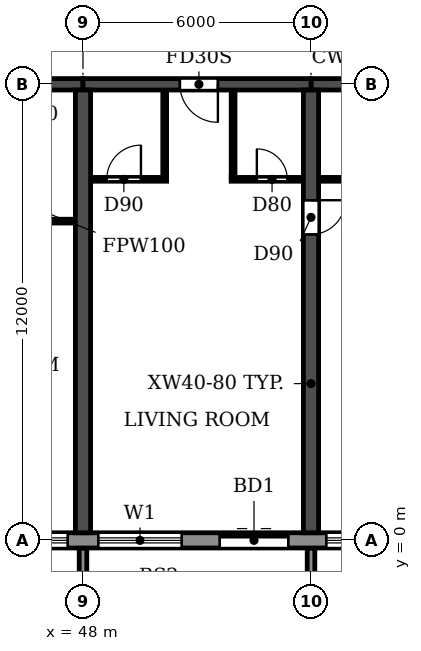
"""IFC4 building model, lengths in metres.
Left out: names, types, materials, properties, quantities, classifications, styles, units other than length and angle.
Written with IfcOpenShell. Run it as: python <this file> out.ifc"""

import sys

from ifc_helpers import new_model, si_unit, direction, frame, frame_2d, origin, place, context, subcontext, project, spatial, polyline, rectangle, outline, extrude, source, transform, mapped, element, fill, save


model = new_model("IFC4")
c1 = context("Model", 3, precision=1e-05, world=origin(), true_north=direction((0.0, 1.0)))
c2 = subcontext(c1, "Body", "Model", "MODEL_VIEW")
j1 = project(units=[si_unit("LENGTHUNIT", "METRE"), si_unit("PLANEANGLEUNIT", "RADIAN")], contexts=[c1])
p1 = place(None, origin())
s1 = spatial("IfcSite", under=j1, at=p1, CompositionType="ELEMENT")
p2 = place(p1, origin())
s2 = spatial("IfcBuilding", under=s1, at=p2, CompositionType="ELEMENT")
p3 = place(p2, frame((0.0, 0.0, 43.2)))
s3 = spatial("IfcBuildingStorey", under=s2, at=p3, CompositionType="ELEMENT", Elevation=43.2)
p4 = place(p3, frame((48.0, 0.2, 0.0), z_axis=(0.0, 0.0, 1.0), x_axis=(0.0, 1.0, 0.0)))
e1 = element("IfcWall", 1, at=p4, inside=s3, PredefinedType="SHEAR", context=c2, shape_type="SweptSolid", body=[
    extrude(rectangle(XDim=11.65, YDim=0.4, at=frame_2d((5.825, 0.0))), origin(), (0.0, 0.0, 1.0), 3.05),
])
p5 = place(p3, frame((54.0, 0.2, 0.0), z_axis=(0.0, 0.0, 1.0), x_axis=(0.0, 1.0, 0.0)))
e2 = element("IfcWall", 2, at=p5, inside=s3, PredefinedType="SHEAR", context=c2, shape_type="SweptSolid", body=[
    extrude(rectangle(XDim=11.65, YDim=0.4, at=frame_2d((5.825, 0.0))), origin(), (0.0, 0.0, 1.0), 3.05),
])
p6 = place(p5, frame((7.85, 0.0, 0.0)))
e3 = element("IfcOpeningElement", 3, at=p6, cuts=e2, PredefinedType="OPENING", context=c2, shape_type="SweptSolid", body=[
    extrude(rectangle(XDim=0.9, YDim=2.1, at=frame_2d((0.45, 1.05))), frame((0.0, 0.21, 0.0), z_axis=(0.0, -1.0, 0.0), x_axis=(1.0, 0.0, 0.0)), (0.0, 0.0, 1.0), 0.42),
])
p7 = place(p3, frame((42.0, 12.0, 0.0), z_axis=(0.0, 0.0, 1.0), x_axis=(1.0, 0.0, 0.0)))
e4 = element("IfcWall", 4, at=p7, inside=s3, PredefinedType="SHEAR", context=c2, shape_type="SweptSolid", body=[
    extrude(rectangle(XDim=6.0, YDim=0.3, at=frame_2d((3.0, 0.0))), origin(), (0.0, 0.0, 1.0), 2.45),
])
p8 = place(p7, frame((2.45, 0.0, 0.0)))
e5 = element("IfcOpeningElement", 5, at=p8, cuts=e4, PredefinedType="OPENING", context=c2, shape_type="SweptSolid", body=[
    extrude(rectangle(XDim=1.0, YDim=2.1, at=frame_2d((0.5, 1.05))), frame((0.0, 0.16, 0.0), z_axis=(0.0, -1.0, 0.0), x_axis=(1.0, 0.0, 0.0)), (0.0, 0.0, 1.0), 0.32),
])
p9 = place(p3, frame((48.0, 12.0, 0.0), z_axis=(0.0, 0.0, 1.0), x_axis=(1.0, 0.0, 0.0)))
e6 = element("IfcWall", 6, at=p9, inside=s3, PredefinedType="SHEAR", context=c2, shape_type="SweptSolid", body=[
    extrude(rectangle(XDim=6.0, YDim=0.3, at=frame_2d((3.0, 0.0))), origin(), (0.0, 0.0, 1.0), 2.45),
])
p10 = place(p9, frame((2.55, 0.0, 0.0)))
e7 = element("IfcOpeningElement", 7, at=p10, cuts=e6, PredefinedType="OPENING", context=c2, shape_type="SweptSolid", body=[
    extrude(rectangle(XDim=1.0, YDim=2.1, at=frame_2d((0.5, 1.05))), frame((0.0, 0.16, 0.0), z_axis=(0.0, -1.0, 0.0), x_axis=(1.0, 0.0, 0.0)), (0.0, 0.0, 1.0), 0.32),
])
p11 = place(p3, frame((54.0, 12.0, 0.0), z_axis=(0.0, 0.0, 1.0), x_axis=(1.0, 0.0, 0.0)))
e8 = element("IfcWall", 8, at=p11, inside=s3, PredefinedType="SHEAR", context=c2, shape_type="SweptSolid", body=[
    extrude(rectangle(XDim=6.0, YDim=0.3, at=frame_2d((3.0, 0.0))), origin(), (0.0, 0.0, 1.0), 2.45),
])
p12 = place(p3, frame((4.683, 0.0, 0.0), z_axis=(0.0, 0.0, 1.0), x_axis=(1.0, 0.0, 0.0)))
e9 = element("IfcWall", 9, at=p12, inside=s3, PredefinedType="STANDARD", context=c2, shape_type="SweptSolid", body=[
    extrude(rectangle(XDim=92.634, YDim=0.4, at=frame_2d((46.317, 0.0))), origin(), (0.0, 0.0, 1.0), 3.05),
])
p13 = place(p12, frame((1.717, 0.0, 0.9)))
e10 = element("IfcOpeningElement", 10, at=p13, cuts=e9, PredefinedType="OPENING", context=c2, shape_type="SweptSolid", body=[
    extrude(rectangle(XDim=2.2, YDim=1.5, at=frame_2d((1.1, 0.75))), frame((0.0, 0.21, 0.0), z_axis=(0.0, -1.0, 0.0), x_axis=(1.0, 0.0, 0.0)), (0.0, 0.0, 1.0), 0.42),
])
p14 = place(p12, frame((4.717, 0.0, 0.9)))
e11 = element("IfcOpeningElement", 11, at=p14, cuts=e9, PredefinedType="OPENING", context=c2, shape_type="SweptSolid", body=[
    extrude(rectangle(XDim=2.2, YDim=1.5, at=frame_2d((1.1, 0.75))), frame((0.0, 0.21, 0.0), z_axis=(0.0, -1.0, 0.0), x_axis=(1.0, 0.0, 0.0)), (0.0, 0.0, 1.0), 0.42),
])
p15 = place(p12, frame((7.717, 0.0, 0.9)))
e12 = element("IfcOpeningElement", 12, at=p15, cuts=e9, PredefinedType="OPENING", context=c2, shape_type="SweptSolid", body=[
    extrude(rectangle(XDim=2.2, YDim=1.5, at=frame_2d((1.1, 0.75))), frame((0.0, 0.21, 0.0), z_axis=(0.0, -1.0, 0.0), x_axis=(1.0, 0.0, 0.0)), (0.0, 0.0, 1.0), 0.42),
])
p16 = place(p12, frame((10.917, 0.0, 0.0)))
e13 = element("IfcOpeningElement", 13, at=p16, cuts=e9, PredefinedType="OPENING", context=c2, shape_type="SweptSolid", body=[
    extrude(rectangle(XDim=1.8, YDim=2.4, at=frame_2d((0.9, 1.2))), frame((0.0, 0.21, 0.0), z_axis=(0.0, -1.0, 0.0), x_axis=(1.0, 0.0, 0.0)), (0.0, 0.0, 1.0), 0.42),
])
p17 = place(p12, frame((13.717, 0.0, 0.9)))
e14 = element("IfcOpeningElement", 14, at=p17, cuts=e9, PredefinedType="OPENING", context=c2, shape_type="SweptSolid", body=[
    extrude(rectangle(XDim=2.2, YDim=1.5, at=frame_2d((1.1, 0.75))), frame((0.0, 0.21, 0.0), z_axis=(0.0, -1.0, 0.0), x_axis=(1.0, 0.0, 0.0)), (0.0, 0.0, 1.0), 0.42),
])
p18 = place(p12, frame((16.717, 0.0, 0.9)))
e15 = element("IfcOpeningElement", 15, at=p18, cuts=e9, PredefinedType="OPENING", context=c2, shape_type="SweptSolid", body=[
    extrude(rectangle(XDim=2.2, YDim=1.5, at=frame_2d((1.1, 0.75))), frame((0.0, 0.21, 0.0), z_axis=(0.0, -1.0, 0.0), x_axis=(1.0, 0.0, 0.0)), (0.0, 0.0, 1.0), 0.42),
])
p19 = place(p12, frame((19.917, 0.0, 0.0)))
e16 = element("IfcOpeningElement", 16, at=p19, cuts=e9, PredefinedType="OPENING", context=c2, shape_type="SweptSolid", body=[
    extrude(rectangle(XDim=1.8, YDim=2.4, at=frame_2d((0.9, 1.2))), frame((0.0, 0.21, 0.0), z_axis=(0.0, -1.0, 0.0), x_axis=(1.0, 0.0, 0.0)), (0.0, 0.0, 1.0), 0.42),
])
p20 = place(p12, frame((22.717, 0.0, 0.9)))
e17 = element("IfcOpeningElement", 17, at=p20, cuts=e9, PredefinedType="OPENING", context=c2, shape_type="SweptSolid", body=[
    extrude(rectangle(XDim=2.2, YDim=1.5, at=frame_2d((1.1, 0.75))), frame((0.0, 0.21, 0.0), z_axis=(0.0, -1.0, 0.0), x_axis=(1.0, 0.0, 0.0)), (0.0, 0.0, 1.0), 0.42),
])
p21 = place(p12, frame((25.717, 0.0, 0.9)))
e18 = element("IfcOpeningElement", 18, at=p21, cuts=e9, PredefinedType="OPENING", context=c2, shape_type="SweptSolid", body=[
    extrude(rectangle(XDim=2.2, YDim=1.5, at=frame_2d((1.1, 0.75))), frame((0.0, 0.21, 0.0), z_axis=(0.0, -1.0, 0.0), x_axis=(1.0, 0.0, 0.0)), (0.0, 0.0, 1.0), 0.42),
])
p22 = place(p12, frame((28.717, 0.0, 0.9)))
e19 = element("IfcOpeningElement", 19, at=p22, cuts=e9, PredefinedType="OPENING", context=c2, shape_type="SweptSolid", body=[
    extrude(rectangle(XDim=2.2, YDim=1.5, at=frame_2d((1.1, 0.75))), frame((0.0, 0.21, 0.0), z_axis=(0.0, -1.0, 0.0), x_axis=(1.0, 0.0, 0.0)), (0.0, 0.0, 1.0), 0.42),
])
p23 = place(p12, frame((31.717, 0.0, 0.9)))
e20 = element("IfcOpeningElement", 20, at=p23, cuts=e9, PredefinedType="OPENING", context=c2, shape_type="SweptSolid", body=[
    extrude(rectangle(XDim=2.2, YDim=1.5, at=frame_2d((1.1, 0.75))), frame((0.0, 0.21, 0.0), z_axis=(0.0, -1.0, 0.0), x_axis=(1.0, 0.0, 0.0)), (0.0, 0.0, 1.0), 0.42),
])
p24 = place(p12, frame((34.917, 0.0, 0.0)))
e21 = element("IfcOpeningElement", 21, at=p24, cuts=e9, PredefinedType="OPENING", context=c2, shape_type="SweptSolid", body=[
    extrude(rectangle(XDim=1.8, YDim=2.4, at=frame_2d((0.9, 1.2))), frame((0.0, 0.21, 0.0), z_axis=(0.0, -1.0, 0.0), x_axis=(1.0, 0.0, 0.0)), (0.0, 0.0, 1.0), 0.42),
])
p25 = place(p12, frame((37.717, 0.0, 0.9)))
e22 = element("IfcOpeningElement", 22, at=p25, cuts=e9, PredefinedType="OPENING", context=c2, shape_type="SweptSolid", body=[
    extrude(rectangle(XDim=2.2, YDim=1.5, at=frame_2d((1.1, 0.75))), frame((0.0, 0.21, 0.0), z_axis=(0.0, -1.0, 0.0), x_axis=(1.0, 0.0, 0.0)), (0.0, 0.0, 1.0), 0.42),
])
p26 = place(p12, frame((40.717, 0.0, 0.9)))
e23 = element("IfcOpeningElement", 23, at=p26, cuts=e9, PredefinedType="OPENING", context=c2, shape_type="SweptSolid", body=[
    extrude(rectangle(XDim=2.2, YDim=1.5, at=frame_2d((1.1, 0.75))), frame((0.0, 0.21, 0.0), z_axis=(0.0, -1.0, 0.0), x_axis=(1.0, 0.0, 0.0)), (0.0, 0.0, 1.0), 0.42),
])
p27 = place(p12, frame((43.717, 0.0, 0.9)))
e24 = element("IfcOpeningElement", 24, at=p27, cuts=e9, PredefinedType="OPENING", context=c2, shape_type="SweptSolid", body=[
    extrude(rectangle(XDim=2.2, YDim=1.5, at=frame_2d((1.1, 0.75))), frame((0.0, 0.21, 0.0), z_axis=(0.0, -1.0, 0.0), x_axis=(1.0, 0.0, 0.0)), (0.0, 0.0, 1.0), 0.42),
])
p28 = place(p12, frame((46.917, 0.0, 0.0)))
e25 = element("IfcOpeningElement", 25, at=p28, cuts=e9, PredefinedType="OPENING", context=c2, shape_type="SweptSolid", body=[
    extrude(rectangle(XDim=1.8, YDim=2.4, at=frame_2d((0.9, 1.2))), frame((0.0, 0.21, 0.0), z_axis=(0.0, -1.0, 0.0), x_axis=(1.0, 0.0, 0.0)), (0.0, 0.0, 1.0), 0.42),
])
p29 = place(p12, frame((49.717, 0.0, 0.9)))
e26 = element("IfcOpeningElement", 26, at=p29, cuts=e9, PredefinedType="OPENING", context=c2, shape_type="SweptSolid", body=[
    extrude(rectangle(XDim=2.2, YDim=1.5, at=frame_2d((1.1, 0.75))), frame((0.0, 0.21, 0.0), z_axis=(0.0, -1.0, 0.0), x_axis=(1.0, 0.0, 0.0)), (0.0, 0.0, 1.0), 0.42),
])
p30 = place(p12, frame((52.717, 0.0, 0.9)))
e27 = element("IfcOpeningElement", 27, at=p30, cuts=e9, PredefinedType="OPENING", context=c2, shape_type="SweptSolid", body=[
    extrude(rectangle(XDim=2.2, YDim=1.5, at=frame_2d((1.1, 0.75))), frame((0.0, 0.21, 0.0), z_axis=(0.0, -1.0, 0.0), x_axis=(1.0, 0.0, 0.0)), (0.0, 0.0, 1.0), 0.42),
])
p31 = place(p12, frame((55.717, 0.0, 0.9)))
e28 = element("IfcOpeningElement", 28, at=p31, cuts=e9, PredefinedType="OPENING", context=c2, shape_type="SweptSolid", body=[
    extrude(rectangle(XDim=2.2, YDim=1.5, at=frame_2d((1.1, 0.75))), frame((0.0, 0.21, 0.0), z_axis=(0.0, -1.0, 0.0), x_axis=(1.0, 0.0, 0.0)), (0.0, 0.0, 1.0), 0.42),
])
p32 = place(p12, frame((58.917, 0.0, 0.0)))
e29 = element("IfcOpeningElement", 29, at=p32, cuts=e9, PredefinedType="OPENING", context=c2, shape_type="SweptSolid", body=[
    extrude(rectangle(XDim=1.8, YDim=2.4, at=frame_2d((0.9, 1.2))), frame((0.0, 0.21, 0.0), z_axis=(0.0, -1.0, 0.0), x_axis=(1.0, 0.0, 0.0)), (0.0, 0.0, 1.0), 0.42),
])
p33 = place(p12, frame((61.717, 0.0, 0.9)))
e30 = element("IfcOpeningElement", 30, at=p33, cuts=e9, PredefinedType="OPENING", context=c2, shape_type="SweptSolid", body=[
    extrude(rectangle(XDim=2.2, YDim=1.5, at=frame_2d((1.1, 0.75))), frame((0.0, 0.21, 0.0), z_axis=(0.0, -1.0, 0.0), x_axis=(1.0, 0.0, 0.0)), (0.0, 0.0, 1.0), 0.42),
])
p34 = place(p12, frame((64.717, 0.0, 0.9)))
e31 = element("IfcOpeningElement", 31, at=p34, cuts=e9, PredefinedType="OPENING", context=c2, shape_type="SweptSolid", body=[
    extrude(rectangle(XDim=2.2, YDim=1.5, at=frame_2d((1.1, 0.75))), frame((0.0, 0.21, 0.0), z_axis=(0.0, -1.0, 0.0), x_axis=(1.0, 0.0, 0.0)), (0.0, 0.0, 1.0), 0.42),
])
p35 = place(p12, frame((67.717, 0.0, 0.9)))
e32 = element("IfcOpeningElement", 32, at=p35, cuts=e9, PredefinedType="OPENING", context=c2, shape_type="SweptSolid", body=[
    extrude(rectangle(XDim=2.2, YDim=1.5, at=frame_2d((1.1, 0.75))), frame((0.0, 0.21, 0.0), z_axis=(0.0, -1.0, 0.0), x_axis=(1.0, 0.0, 0.0)), (0.0, 0.0, 1.0), 0.42),
])
p36 = place(p12, frame((70.917, 0.0, 0.0)))
e33 = element("IfcOpeningElement", 33, at=p36, cuts=e9, PredefinedType="OPENING", context=c2, shape_type="SweptSolid", body=[
    extrude(rectangle(XDim=1.8, YDim=2.4, at=frame_2d((0.9, 1.2))), frame((0.0, 0.21, 0.0), z_axis=(0.0, -1.0, 0.0), x_axis=(1.0, 0.0, 0.0)), (0.0, 0.0, 1.0), 0.42),
])
p37 = place(p12, frame((73.717, 0.0, 0.9)))
e34 = element("IfcOpeningElement", 34, at=p37, cuts=e9, PredefinedType="OPENING", context=c2, shape_type="SweptSolid", body=[
    extrude(rectangle(XDim=2.2, YDim=1.5, at=frame_2d((1.1, 0.75))), frame((0.0, 0.21, 0.0), z_axis=(0.0, -1.0, 0.0), x_axis=(1.0, 0.0, 0.0)), (0.0, 0.0, 1.0), 0.42),
])
p38 = place(p12, frame((76.717, 0.0, 0.9)))
e35 = element("IfcOpeningElement", 35, at=p38, cuts=e9, PredefinedType="OPENING", context=c2, shape_type="SweptSolid", body=[
    extrude(rectangle(XDim=2.2, YDim=1.5, at=frame_2d((1.1, 0.75))), frame((0.0, 0.21, 0.0), z_axis=(0.0, -1.0, 0.0), x_axis=(1.0, 0.0, 0.0)), (0.0, 0.0, 1.0), 0.42),
])
p39 = place(p12, frame((79.717, 0.0, 0.9)))
e36 = element("IfcOpeningElement", 36, at=p39, cuts=e9, PredefinedType="OPENING", context=c2, shape_type="SweptSolid", body=[
    extrude(rectangle(XDim=2.2, YDim=1.5, at=frame_2d((1.1, 0.75))), frame((0.0, 0.21, 0.0), z_axis=(0.0, -1.0, 0.0), x_axis=(1.0, 0.0, 0.0)), (0.0, 0.0, 1.0), 0.42),
])
p40 = place(p12, frame((82.917, 0.0, 0.0)))
e37 = element("IfcOpeningElement", 37, at=p40, cuts=e9, PredefinedType="OPENING", context=c2, shape_type="SweptSolid", body=[
    extrude(rectangle(XDim=1.8, YDim=2.4, at=frame_2d((0.9, 1.2))), frame((0.0, 0.21, 0.0), z_axis=(0.0, -1.0, 0.0), x_axis=(1.0, 0.0, 0.0)), (0.0, 0.0, 1.0), 0.42),
])
p41 = place(p12, frame((85.717, 0.0, 0.9)))
e38 = element("IfcOpeningElement", 38, at=p41, cuts=e9, PredefinedType="OPENING", context=c2, shape_type="SweptSolid", body=[
    extrude(rectangle(XDim=2.2, YDim=1.5, at=frame_2d((1.1, 0.75))), frame((0.0, 0.21, 0.0), z_axis=(0.0, -1.0, 0.0), x_axis=(1.0, 0.0, 0.0)), (0.0, 0.0, 1.0), 0.42),
])
p42 = place(p12, frame((88.717, 0.0, 0.9)))
e39 = element("IfcOpeningElement", 39, at=p42, cuts=e9, PredefinedType="OPENING", context=c2, shape_type="SweptSolid", body=[
    extrude(rectangle(XDim=2.2, YDim=1.5, at=frame_2d((1.1, 0.75))), frame((0.0, 0.21, 0.0), z_axis=(0.0, -1.0, 0.0), x_axis=(1.0, 0.0, 0.0)), (0.0, 0.0, 1.0), 0.42),
])
m1 = source(origin(), c2, "Body", "SweptSolid", [
    extrude(outline(polyline([(0.0, 0.0), (0.2, 0.0), (0.2, 1.65), (0.0, 1.65), (0.0, 0.0)])), origin(), (0.0, 0.0, 1.0), 3.1),
])
for number, where in (
    (40, (47.9, -1.85, 0.0)),
    (41, (53.9, -1.85, 0.0)),
):
    element("IfcWall", number, at=place(p3, frame(where)), inside=s3, PredefinedType="STANDARD", context=c2, shape_type="MappedRepresentation", body=[
        mapped(m1, transform((0.0, 0.0, 0.0))),
    ])
p43 = place(p3, frame((45.8, 8.4, 0.0), z_axis=(0.0, 0.0, 1.0), x_axis=(1.0, 0.0, 0.0)))
e42 = element("IfcWall", 42, at=p43, inside=s3, PredefinedType="PARTITIONING", context=c2, shape_type="SweptSolid", body=[
    extrude(rectangle(XDim=1.99, YDim=0.1, at=frame_2d((0.995, 0.0))), origin(), (0.0, 0.0, 1.0), 3.05),
])
p44 = place(p3, frame((48.21, 9.5, 0.0), z_axis=(0.0, 0.0, 1.0), x_axis=(1.0, 0.0, 0.0)))
e43 = element("IfcWall", 43, at=p44, inside=s3, PredefinedType="PARTITIONING", context=c2, shape_type="SweptSolid", body=[
    extrude(rectangle(XDim=1.99, YDim=0.1, at=frame_2d((0.995, 0.0))), origin(), (0.0, 0.0, 1.0), 3.05),
])
p45 = place(p44, frame((0.415, 0.0, 0.0)))
e44 = element("IfcOpeningElement", 44, at=p45, cuts=e43, PredefinedType="OPENING", context=c2, shape_type="SweptSolid", body=[
    extrude(rectangle(XDim=0.9, YDim=2.1, at=frame_2d((0.45, 1.05))), frame((0.0, 0.06, 0.0), z_axis=(0.0, -1.0, 0.0), x_axis=(1.0, 0.0, 0.0)), (0.0, 0.0, 1.0), 0.12),
])
p46 = place(p3, frame((51.9, 9.5, 0.0), z_axis=(0.0, 0.0, 1.0), x_axis=(1.0, 0.0, 0.0)))
e45 = element("IfcWall", 45, at=p46, inside=s3, PredefinedType="PARTITIONING", context=c2, shape_type="SweptSolid", body=[
    extrude(rectangle(XDim=1.89, YDim=0.1, at=frame_2d((0.945, 0.0))), origin(), (0.0, 0.0, 1.0), 3.05),
])
p47 = place(p46, frame((0.675, 0.0, 0.0)))
e46 = element("IfcOpeningElement", 46, at=p47, cuts=e45, PredefinedType="OPENING", context=c2, shape_type="SweptSolid", body=[
    extrude(rectangle(XDim=0.8, YDim=2.1, at=frame_2d((0.4, 1.05))), frame((0.0, 0.06, 0.0), z_axis=(0.0, -1.0, 0.0), x_axis=(1.0, 0.0, 0.0)), (0.0, 0.0, 1.0), 0.12),
])
p48 = place(p3, frame((54.21, 9.5, 0.0), z_axis=(0.0, 0.0, 1.0), x_axis=(1.0, 0.0, 0.0)))
e47 = element("IfcWall", 47, at=p48, inside=s3, PredefinedType="PARTITIONING", context=c2, shape_type="SweptSolid", body=[
    extrude(rectangle(XDim=2.69, YDim=0.1, at=frame_2d((1.345, 0.0))), origin(), (0.0, 0.0, 1.0), 3.05),
])
p49 = place(p48, frame((0.89, 0.0, 0.0)))
e48 = element("IfcOpeningElement", 48, at=p49, cuts=e47, PredefinedType="OPENING", context=c2, shape_type="SweptSolid", body=[
    extrude(rectangle(XDim=0.8, YDim=2.1, at=frame_2d((0.4, 1.05))), frame((0.0, 0.06, 0.0), z_axis=(0.0, -1.0, 0.0), x_axis=(1.0, 0.0, 0.0)), (0.0, 0.0, 1.0), 0.12),
])
for number, where, z_axis, x_axis in (
    (49, (50.15, 9.55, 0.0), (0.0, 0.0, 1.0), (0.0, 1.0, 0.0)),
    (50, (51.95, 9.55, 0.0), (0.0, 0.0, 1.0), (0.0, 1.0, 0.0)),
):
    element("IfcWall", number, at=place(p3, frame(where, z_axis=z_axis, x_axis=x_axis)), inside=s3, PredefinedType="PARTITIONING", context=c2, shape_type="SweptSolid", body=[
        extrude(rectangle(XDim=2.29, YDim=0.1, at=frame_2d((1.145, 0.0))), origin(), (0.0, 0.0, 1.0), 3.05),
    ])
p50 = place(p26, origin())
e51 = element("IfcWindow", 51, at=p50, inside=s3, PartitioningType="DOUBLE_PANEL_HORIZONTAL", PredefinedType="WINDOW", context=c2, shape_type="SweptSolid", body=[
    extrude(rectangle(XDim=2.2, YDim=1.5, at=frame_2d((1.1, 0.75))), frame((0.0, 0.03, 0.0), z_axis=(0.0, -1.0, 0.0), x_axis=(1.0, 0.0, 0.0)), (0.0, 0.0, 1.0), 0.06),
])
fill(e23, e51)
p51 = place(p27, origin())
e52 = element("IfcWindow", 52, at=p51, inside=s3, PartitioningType="DOUBLE_PANEL_HORIZONTAL", PredefinedType="WINDOW", context=c2, shape_type="SweptSolid", body=[
    extrude(rectangle(XDim=2.2, YDim=1.5, at=frame_2d((1.1, 0.75))), frame((0.0, 0.03, 0.0), z_axis=(0.0, -1.0, 0.0), x_axis=(1.0, 0.0, 0.0)), (0.0, 0.0, 1.0), 0.06),
])
fill(e24, e52)
p52 = place(p28, origin())
e53 = element("IfcDoor", 53, at=p52, inside=s3, OperationType="DOUBLE_DOOR_SLIDING", PredefinedType="DOOR", context=c2, shape_type="SweptSolid", body=[
    extrude(rectangle(XDim=1.8, YDim=2.4, at=frame_2d((0.9, 1.2))), frame((0.0, 0.025, 0.0), z_axis=(0.0, -1.0, 0.0), x_axis=(1.0, 0.0, 0.0)), (0.0, 0.0, 1.0), 0.05),
])
fill(e25, e53)
p53 = place(p29, origin())
e54 = element("IfcWindow", 54, at=p53, inside=s3, PartitioningType="DOUBLE_PANEL_HORIZONTAL", PredefinedType="WINDOW", context=c2, shape_type="SweptSolid", body=[
    extrude(rectangle(XDim=2.2, YDim=1.5, at=frame_2d((1.1, 0.75))), frame((0.0, 0.03, 0.0), z_axis=(0.0, -1.0, 0.0), x_axis=(1.0, 0.0, 0.0)), (0.0, 0.0, 1.0), 0.06),
])
fill(e26, e54)
p54 = place(p45, origin())
e55 = element("IfcDoor", 55, at=p54, inside=s3, OperationType="SINGLE_SWING_RIGHT", PredefinedType="DOOR", context=c2, shape_type="SweptSolid", body=[
    extrude(rectangle(XDim=0.9, YDim=2.1, at=frame_2d((0.45, 1.05))), frame((0.0, 0.025, 0.0), z_axis=(0.0, -1.0, 0.0), x_axis=(1.0, 0.0, 0.0)), (0.0, 0.0, 1.0), 0.05),
])
fill(e44, e55)
p55 = place(p10, frame((1.0, 0.0, 0.0), z_axis=(0.0, 0.0, 1.0), x_axis=(-1.0, 0.0, 0.0)))
e56 = element("IfcDoor", 56, at=p55, inside=s3, OperationType="SINGLE_SWING_LEFT", PredefinedType="DOOR", context=c2, shape_type="SweptSolid", body=[
    extrude(rectangle(XDim=1.0, YDim=2.1, at=frame_2d((0.5, 1.05))), frame((0.0, 0.025, 0.0), z_axis=(0.0, -1.0, 0.0), x_axis=(1.0, 0.0, 0.0)), (0.0, 0.0, 1.0), 0.05),
])
fill(e7, e56)
p56 = place(p47, origin())
e57 = element("IfcDoor", 57, at=p56, inside=s3, OperationType="SINGLE_SWING_LEFT", PredefinedType="DOOR", context=c2, shape_type="SweptSolid", body=[
    extrude(rectangle(XDim=0.8, YDim=2.1, at=frame_2d((0.4, 1.05))), frame((0.0, 0.025, 0.0), z_axis=(0.0, -1.0, 0.0), x_axis=(1.0, 0.0, 0.0)), (0.0, 0.0, 1.0), 0.05),
])
fill(e46, e57)
p57 = place(p6, frame((0.9, 0.0, 0.0), z_axis=(0.0, 0.0, 1.0), x_axis=(-1.0, 0.0, 0.0)))
e58 = element("IfcDoor", 58, at=p57, inside=s3, OperationType="SINGLE_SWING_LEFT", PredefinedType="DOOR", context=c2, shape_type="SweptSolid", body=[
    extrude(rectangle(XDim=0.9, YDim=2.1, at=frame_2d((0.45, 1.05))), frame((0.0, 0.025, 0.0), z_axis=(0.0, -1.0, 0.0), x_axis=(1.0, 0.0, 0.0)), (0.0, 0.0, 1.0), 0.05),
])
fill(e3, e58)
save(model, sys.argv[1])
